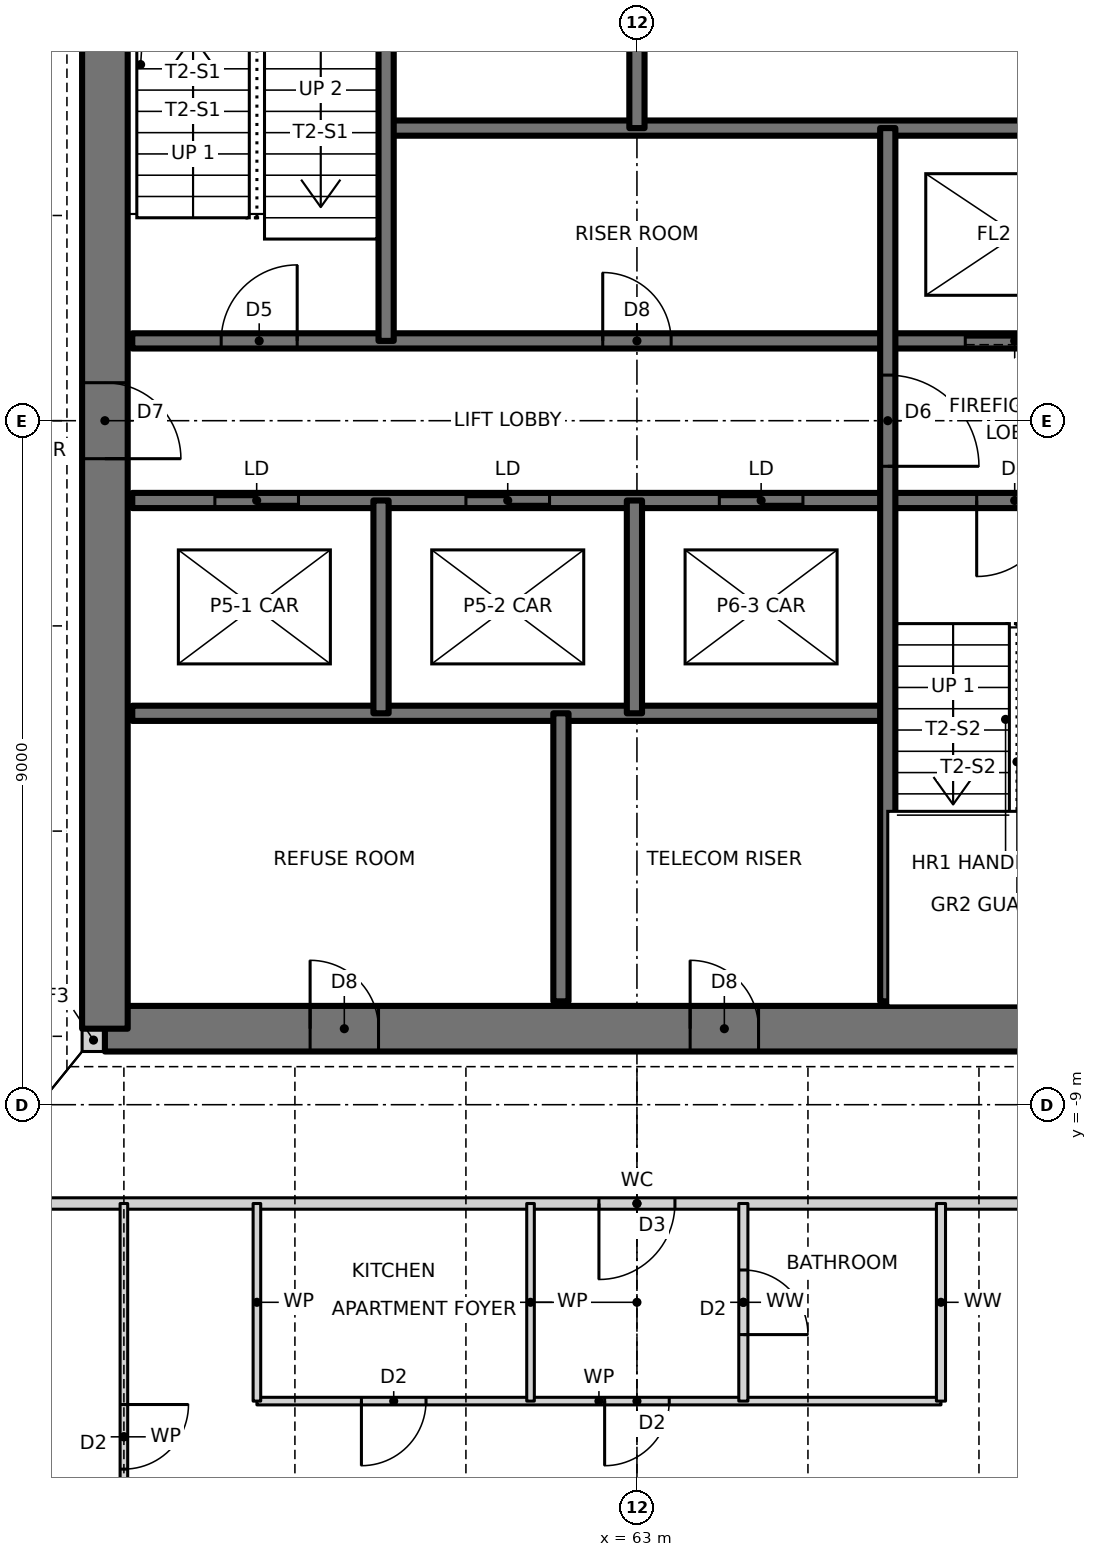
"""IFC4 building model, lengths in metres.
Left out: names, types, materials, properties, quantities, classifications, styles, units other than length and angle.
Written with IfcOpenShell. Run it as: python <this file> out.ifc"""

import sys

from ifc_helpers import new_model, si_unit, direction, frame, frame_2d, origin, place, context, subcontext, project, spatial, rectangle, extrude, element, fill, save


model = new_model("IFC4")
c1 = context("Model", 3, precision=1e-05, world=origin(), true_north=direction((0.0, 1.0)))
c2 = subcontext(c1, "Body", "Model", "MODEL_VIEW")
j1 = project(units=[si_unit("LENGTHUNIT", "METRE"), si_unit("PLANEANGLEUNIT", "RADIAN")], contexts=[c1])
p1 = place(None, origin())
s1 = spatial("IfcSite", under=j1, at=p1, CompositionType="ELEMENT")
p2 = place(p1, origin())
s2 = spatial("IfcBuilding", under=s1, at=p2, CompositionType="ELEMENT")
p3 = place(p2, frame((0.0, 0.0, 108.5)))
s3 = spatial("IfcBuildingStorey", under=s2, at=p3, CompositionType="ELEMENT", Elevation=108.5)
p4 = place(p3, frame((55.7, -8.15, 0.0), z_axis=(0.0, 0.0, 1.0), x_axis=(1.0, 0.0, 0.0)))
e1 = element("IfcWall", 1, at=p4, inside=s3, PredefinedType="SOLIDWALL", context=c2, shape_type="SweptSolid", body=[
    extrude(rectangle(XDim=0.3, YDim=0.3, at=frame_2d((0.15, 0.0))), origin(), (0.0, 0.0, 1.0), 3.5),
])
p5 = place(p3, frame((56.0, -8.0, 0.0), z_axis=(0.0, 0.0, 1.0), x_axis=(1.0, 0.0, 0.0)))
e2 = element("IfcWall", 2, at=p5, inside=s3, PredefinedType="SHEAR", context=c2, shape_type="SweptSolid", body=[
    extrude(rectangle(XDim=14.0, YDim=0.6, at=frame_2d((7.0, 0.0))), origin(), (0.0, 0.0, 1.0), 3.5),
])
p6 = place(p5, frame((2.7, 0.0, 0.0)))
e3 = element("IfcOpeningElement", 3, at=p6, cuts=e2, PredefinedType="OPENING", context=c2, shape_type="SweptSolid", body=[
    extrude(rectangle(XDim=0.9, YDim=2.1, at=frame_2d((0.45, 1.05))), frame((0.0, 0.31, 0.0), z_axis=(0.0, -1.0, 0.0), x_axis=(1.0, 0.0, 0.0)), (0.0, 0.0, 1.0), 0.62),
])
p7 = place(p5, frame((7.7, 0.0, 0.0)))
e4 = element("IfcOpeningElement", 4, at=p7, cuts=e2, PredefinedType="OPENING", context=c2, shape_type="SweptSolid", body=[
    extrude(rectangle(XDim=0.9, YDim=2.1, at=frame_2d((0.45, 1.05))), frame((0.0, 0.31, 0.0), z_axis=(0.0, -1.0, 0.0), x_axis=(1.0, 0.0, 0.0)), (0.0, 0.0, 1.0), 0.62),
])
p8 = place(p3, frame((56.0, 8.0, 0.0), z_axis=(0.0, 0.0, 1.0), x_axis=(0.0, -1.0, 0.0)))
e5 = element("IfcWall", 5, at=p8, inside=s3, PredefinedType="SHEAR", context=c2, shape_type="SweptSolid", body=[
    extrude(rectangle(XDim=16.0, YDim=0.6, at=frame_2d((8.0, 0.0))), origin(), (0.0, 0.0, 1.0), 3.5),
])
p9 = place(p8, frame((7.5, 0.0, 0.0)))
e6 = element("IfcOpeningElement", 6, at=p9, cuts=e5, PredefinedType="OPENING", context=c2, shape_type="SweptSolid", body=[
    extrude(rectangle(XDim=1.0, YDim=2.1, at=frame_2d((0.5, 1.05))), frame((0.0, 0.31, 0.0), z_axis=(0.0, -1.0, 0.0), x_axis=(1.0, 0.0, 0.0)), (0.0, 0.0, 1.0), 0.62),
])
p10 = place(p3, frame((58.0, -12.9, 0.0), z_axis=(0.0, 0.0, 1.0), x_axis=(1.0, 0.0, 0.0)))
e7 = element("IfcWall", 7, at=p10, inside=s3, PredefinedType="PARTITIONING", context=c2, shape_type="SweptSolid", body=[
    extrude(rectangle(XDim=9.0, YDim=0.1, at=frame_2d((4.5, 0.0))), origin(), (0.0, 0.0, 1.0), 3.27),
])
p11 = place(p10, frame((1.375, 0.0, 0.0)))
e8 = element("IfcOpeningElement", 8, at=p11, cuts=e7, PredefinedType="OPENING", context=c2, shape_type="SweptSolid", body=[
    extrude(rectangle(XDim=0.85, YDim=2.1, at=frame_2d((0.425, 1.05))), frame((0.0, 0.06, 0.0), z_axis=(0.0, -1.0, 0.0), x_axis=(1.0, 0.0, 0.0)), (0.0, 0.0, 1.0), 0.12),
])
p12 = place(p10, frame((4.575, 0.0, 0.0)))
e9 = element("IfcOpeningElement", 9, at=p12, cuts=e7, PredefinedType="OPENING", context=c2, shape_type="SweptSolid", body=[
    extrude(rectangle(XDim=0.85, YDim=2.1, at=frame_2d((0.425, 1.05))), frame((0.0, 0.06, 0.0), z_axis=(0.0, -1.0, 0.0), x_axis=(1.0, 0.0, 0.0)), (0.0, 0.0, 1.0), 0.12),
])
p13 = place(p3, frame((53.7, -10.3, 0.0), z_axis=(0.0, 0.0, 1.0), x_axis=(1.0, 0.0, 0.0)))
e10 = element("IfcWall", 10, at=p13, inside=s3, PredefinedType="PARTITIONING", context=c2, shape_type="SweptSolid", body=[
    extrude(rectangle(XDim=18.6, YDim=0.15, at=frame_2d((9.3, 0.0))), origin(), (0.0, 0.0, 1.0), 3.27),
])
p14 = place(p13, frame((8.8, 0.0, 0.0)))
e11 = element("IfcOpeningElement", 11, at=p14, cuts=e10, PredefinedType="OPENING", context=c2, shape_type="SweptSolid", body=[
    extrude(rectangle(XDim=1.0, YDim=2.1, at=frame_2d((0.5, 1.05))), frame((0.0, 0.085, 0.0), z_axis=(0.0, -1.0, 0.0), x_axis=(1.0, 0.0, 0.0)), (0.0, 0.0, 1.0), 0.17),
])
p15 = place(p3, frame((56.36, -3.85, 0.0), z_axis=(0.0, 0.0, 1.0), x_axis=(1.0, 0.0, 0.0)))
e12 = element("IfcWall", 12, at=p15, inside=s3, PredefinedType="SOLIDWALL", context=c2, shape_type="SweptSolid", body=[
    extrude(rectangle(XDim=9.94, YDim=0.2, at=frame_2d((4.97, 0.0))), origin(), (0.0, 0.0, 1.0), 3.5),
])
p16 = place(p3, frame((56.36, -1.05, 0.0), z_axis=(0.0, 0.0, 1.0), x_axis=(1.0, 0.0, 0.0)))
e13 = element("IfcWall", 13, at=p16, inside=s3, PredefinedType="SOLIDWALL", context=c2, shape_type="SweptSolid", body=[
    extrude(rectangle(XDim=13.28, YDim=0.2, at=frame_2d((6.64, 0.0))), origin(), (0.0, 0.0, 1.0), 3.5),
])
p17 = place(p16, frame((11.11, 0.0, 0.0)))
e14 = element("IfcOpeningElement", 14, at=p17, cuts=e13, PredefinedType="OPENING", context=c2, shape_type="SweptSolid", body=[
    extrude(rectangle(XDim=1.0, YDim=2.1, at=frame_2d((0.5, 1.05))), frame((0.0, 0.11, 0.0), z_axis=(0.0, -1.0, 0.0), x_axis=(1.0, 0.0, 0.0)), (0.0, 0.0, 1.0), 0.22),
])
p18 = place(p16, frame((1.087, 0.0, 0.0)))
e15 = element("IfcOpeningElement", 15, at=p18, cuts=e13, PredefinedType="OPENING", context=c2, shape_type="SweptSolid", body=[
    extrude(rectangle(XDim=1.1, YDim=2.1, at=frame_2d((0.55, 1.05))), frame((0.0, 0.11, 0.0), z_axis=(0.0, -1.0, 0.0), x_axis=(1.0, 0.0, 0.0)), (0.0, 0.0, 1.0), 0.22),
])
p19 = place(p16, frame((4.39, 0.0, 0.0)))
e16 = element("IfcOpeningElement", 16, at=p19, cuts=e13, PredefinedType="OPENING", context=c2, shape_type="SweptSolid", body=[
    extrude(rectangle(XDim=1.1, YDim=2.1, at=frame_2d((0.55, 1.05))), frame((0.0, 0.11, 0.0), z_axis=(0.0, -1.0, 0.0), x_axis=(1.0, 0.0, 0.0)), (0.0, 0.0, 1.0), 0.22),
])
p20 = place(p16, frame((7.724, 0.0, 0.0)))
e17 = element("IfcOpeningElement", 17, at=p20, cuts=e13, PredefinedType="OPENING", context=c2, shape_type="SweptSolid", body=[
    extrude(rectangle(XDim=1.1, YDim=2.1, at=frame_2d((0.55, 1.05))), frame((0.0, 0.11, 0.0), z_axis=(0.0, -1.0, 0.0), x_axis=(1.0, 0.0, 0.0)), (0.0, 0.0, 1.0), 0.22),
])
p21 = place(p3, frame((56.36, 1.05, 0.0), z_axis=(0.0, 0.0, 1.0), x_axis=(1.0, 0.0, 0.0)))
e18 = element("IfcWall", 18, at=p21, inside=s3, PredefinedType="SOLIDWALL", context=c2, shape_type="SweptSolid", body=[
    extrude(rectangle(XDim=13.28, YDim=0.2, at=frame_2d((6.64, 0.0))), origin(), (0.0, 0.0, 1.0), 3.5),
])
p22 = place(p21, frame((1.17, 0.0, 0.0)))
e19 = element("IfcOpeningElement", 19, at=p22, cuts=e18, PredefinedType="OPENING", context=c2, shape_type="SweptSolid", body=[
    extrude(rectangle(XDim=1.0, YDim=2.1, at=frame_2d((0.5, 1.05))), frame((0.0, 0.11, 0.0), z_axis=(0.0, -1.0, 0.0), x_axis=(1.0, 0.0, 0.0)), (0.0, 0.0, 1.0), 0.22),
])
p23 = place(p21, frame((6.19, 0.0, 0.0)))
e20 = element("IfcOpeningElement", 20, at=p23, cuts=e18, PredefinedType="OPENING", context=c2, shape_type="SweptSolid", body=[
    extrude(rectangle(XDim=0.9, YDim=2.1, at=frame_2d((0.45, 1.05))), frame((0.0, 0.11, 0.0), z_axis=(0.0, -1.0, 0.0), x_axis=(1.0, 0.0, 0.0)), (0.0, 0.0, 1.0), 0.22),
])
p24 = place(p21, frame((10.96, 0.0, 0.0)))
e21 = element("IfcOpeningElement", 21, at=p24, cuts=e18, PredefinedType="OPENING", context=c2, shape_type="SweptSolid", body=[
    extrude(rectangle(XDim=1.3, YDim=2.1, at=frame_2d((0.65, 1.05))), frame((0.0, 0.11, 0.0), z_axis=(0.0, -1.0, 0.0), x_axis=(1.0, 0.0, 0.0)), (0.0, 0.0, 1.0), 0.22),
])
p25 = place(p3, frame((59.7, 3.85, 0.0), z_axis=(0.0, 0.0, 1.0), x_axis=(1.0, 0.0, 0.0)))
e22 = element("IfcWall", 22, at=p25, inside=s3, PredefinedType="SOLIDWALL", context=c2, shape_type="SweptSolid", body=[
    extrude(rectangle(XDim=9.94, YDim=0.2, at=frame_2d((4.97, 0.0))), origin(), (0.0, 0.0, 1.0), 3.5),
])
p26 = place(p3, frame((67.0, -12.9, 0.0), z_axis=(0.0, 0.0, 1.0), x_axis=(0.0, 1.0, 0.0)))
e23 = element("IfcWall", 23, at=p26, inside=s3, PredefinedType="PARTITIONING", context=c2, shape_type="SweptSolid", body=[
    extrude(rectangle(XDim=2.6, YDim=0.12, at=frame_2d((1.3, 0.0))), origin(), (0.0, 0.0, 1.0), 3.27),
])
p27 = place(p3, frame((66.3, -7.64, 0.0), z_axis=(0.0, 0.0, 1.0), x_axis=(0.0, 1.0, 0.0)))
e24 = element("IfcWall", 24, at=p27, inside=s3, PredefinedType="SOLIDWALL", context=c2, shape_type="SweptSolid", body=[
    extrude(rectangle(XDim=11.49, YDim=0.2, at=frame_2d((5.745, 0.0))), origin(), (0.0, 0.0, 1.0), 3.5),
])
p28 = place(p27, frame((7.04, 0.0, 0.0)))
e25 = element("IfcOpeningElement", 25, at=p28, cuts=e24, PredefinedType="OPENING", context=c2, shape_type="SweptSolid", body=[
    extrude(rectangle(XDim=1.2, YDim=2.1, at=frame_2d((0.6, 1.05))), frame((0.0, 0.11, 0.0), z_axis=(0.0, -1.0, 0.0), x_axis=(1.0, 0.0, 0.0)), (0.0, 0.0, 1.0), 0.22),
])
p29 = place(p3, frame((64.4, -12.9, 0.0), z_axis=(0.0, 0.0, 1.0), x_axis=(0.0, 1.0, 0.0)))
e26 = element("IfcWall", 26, at=p29, inside=s3, PredefinedType="PARTITIONING", context=c2, shape_type="SweptSolid", body=[
    extrude(rectangle(XDim=2.6, YDim=0.12, at=frame_2d((1.3, 0.0))), origin(), (0.0, 0.0, 1.0), 3.27),
])
p30 = place(p29, frame((0.875, 0.0, 0.0)))
e27 = element("IfcOpeningElement", 27, at=p30, cuts=e26, PredefinedType="OPENING", context=c2, shape_type="SweptSolid", body=[
    extrude(rectangle(XDim=0.85, YDim=2.1, at=frame_2d((0.425, 1.05))), frame((0.0, 0.07, 0.0), z_axis=(0.0, -1.0, 0.0), x_axis=(1.0, 0.0, 0.0)), (0.0, 0.0, 1.0), 0.14),
])
p31 = place(p3, frame((63.0, 3.85, 0.0), z_axis=(0.0, 0.0, 1.0), x_axis=(0.0, 1.0, 0.0)))
e28 = element("IfcWall", 28, at=p31, inside=s3, PredefinedType="SOLIDWALL", context=c2, shape_type="SweptSolid", body=[
    extrude(rectangle(XDim=3.79, YDim=0.2, at=frame_2d((1.895, 0.0))), origin(), (0.0, 0.0, 1.0), 3.5),
])
p32 = place(p3, frame((62.967, -3.85, 0.0), z_axis=(0.0, 0.0, 1.0), x_axis=(0.0, 1.0, 0.0)))
e29 = element("IfcWall", 29, at=p32, inside=s3, PredefinedType="SOLIDWALL", context=c2, shape_type="SweptSolid", body=[
    extrude(rectangle(XDim=2.8, YDim=0.2, at=frame_2d((1.4, 0.0))), origin(), (0.0, 0.0, 1.0), 3.5),
])
p33 = place(p3, frame((62.0, -7.64, 0.0), z_axis=(0.0, 0.0, 1.0), x_axis=(0.0, 1.0, 0.0)))
e30 = element("IfcWall", 30, at=p33, inside=s3, PredefinedType="SOLIDWALL", context=c2, shape_type="SweptSolid", body=[
    extrude(rectangle(XDim=3.79, YDim=0.2, at=frame_2d((1.895, 0.0))), origin(), (0.0, 0.0, 1.0), 3.5),
])
p34 = place(p3, frame((61.6, -12.9, 0.0), z_axis=(0.0, 0.0, 1.0), x_axis=(0.0, 1.0, 0.0)))
e31 = element("IfcWall", 31, at=p34, inside=s3, PredefinedType="PARTITIONING", context=c2, shape_type="SweptSolid", body=[
    extrude(rectangle(XDim=2.6, YDim=0.1, at=frame_2d((1.3, 0.0))), origin(), (0.0, 0.0, 1.0), 3.27),
])
p35 = place(p3, frame((59.7, 1.05, 0.0), z_axis=(0.0, 0.0, 1.0), x_axis=(0.0, 1.0, 0.0)))
e32 = element("IfcWall", 32, at=p35, inside=s3, PredefinedType="SOLIDWALL", context=c2, shape_type="SweptSolid", body=[
    extrude(rectangle(XDim=6.59, YDim=0.2, at=frame_2d((3.295, 0.0))), origin(), (0.0, 0.0, 1.0), 3.5),
])
p36 = place(p3, frame((59.633, -3.85, 0.0), z_axis=(0.0, 0.0, 1.0), x_axis=(0.0, 1.0, 0.0)))
e33 = element("IfcWall", 33, at=p36, inside=s3, PredefinedType="SOLIDWALL", context=c2, shape_type="SweptSolid", body=[
    extrude(rectangle(XDim=2.8, YDim=0.2, at=frame_2d((1.4, 0.0))), origin(), (0.0, 0.0, 1.0), 3.5),
])
p37 = place(p3, frame((58.0, -12.9, 0.0), z_axis=(0.0, 0.0, 1.0), x_axis=(0.0, 1.0, 0.0)))
e34 = element("IfcWall", 34, at=p37, inside=s3, PredefinedType="PARTITIONING", context=c2, shape_type="SweptSolid", body=[
    extrude(rectangle(XDim=2.6, YDim=0.1, at=frame_2d((1.3, 0.0))), origin(), (0.0, 0.0, 1.0), 3.27),
])
p38 = place(p3, frame((56.25, -16.44, 0.0), z_axis=(0.0, 0.0, 1.0), x_axis=(0.0, 1.0, 0.0)))
e35 = element("IfcWall", 35, at=p38, inside=s3, PredefinedType="PARTITIONING", context=c2, shape_type="SweptSolid", body=[
    extrude(rectangle(XDim=6.14, YDim=0.1, at=frame_2d((3.07, 0.0))), origin(), (0.0, 0.0, 1.0), 2.587),
])
p39 = place(p38, frame((2.645, 0.0, 0.0)))
e36 = element("IfcOpeningElement", 36, at=p39, cuts=e35, PredefinedType="OPENING", context=c2, shape_type="SweptSolid", body=[
    extrude(rectangle(XDim=0.85, YDim=2.1, at=frame_2d((0.425, 1.05))), frame((0.0, 0.06, 0.0), z_axis=(0.0, -1.0, 0.0), x_axis=(1.0, 0.0, 0.0)), (0.0, 0.0, 1.0), 0.12),
])
p40 = place(p22, origin())
e37 = element("IfcDoor", 37, at=p40, inside=s3, OperationType="SINGLE_SWING_RIGHT", PredefinedType="DOOR", context=c2, shape_type="SweptSolid", body=[
    extrude(rectangle(XDim=1.0, YDim=2.1, at=frame_2d((0.5, 1.05))), frame((0.0, 0.025, 0.0), z_axis=(0.0, -1.0, 0.0), x_axis=(1.0, 0.0, 0.0)), (0.0, 0.0, 1.0), 0.05),
])
fill(e19, e37)
p41 = place(p17, frame((1.0, 0.0, 0.0), z_axis=(0.0, 0.0, 1.0), x_axis=(-1.0, 0.0, 0.0)))
e38 = element("IfcDoor", 38, at=p41, inside=s3, OperationType="SINGLE_SWING_RIGHT", PredefinedType="DOOR", context=c2, shape_type="SweptSolid", body=[
    extrude(rectangle(XDim=1.0, YDim=2.1, at=frame_2d((0.5, 1.05))), frame((0.0, 0.025, 0.0), z_axis=(0.0, -1.0, 0.0), x_axis=(1.0, 0.0, 0.0)), (0.0, 0.0, 1.0), 0.05),
])
fill(e14, e38)
p42 = place(p28, frame((1.2, 0.0, 0.0), z_axis=(0.0, 0.0, 1.0), x_axis=(-1.0, 0.0, 0.0)))
e39 = element("IfcDoor", 39, at=p42, inside=s3, OperationType="SINGLE_SWING_RIGHT", PredefinedType="DOOR", context=c2, shape_type="SweptSolid", body=[
    extrude(rectangle(XDim=1.2, YDim=2.1, at=frame_2d((0.6, 1.05))), frame((0.0, 0.025, 0.0), z_axis=(0.0, -1.0, 0.0), x_axis=(1.0, 0.0, 0.0)), (0.0, 0.0, 1.0), 0.05),
])
fill(e25, e39)
p43 = place(p23, origin())
e40 = element("IfcDoor", 40, at=p43, inside=s3, OperationType="SINGLE_SWING_LEFT", PredefinedType="DOOR", context=c2, shape_type="SweptSolid", body=[
    extrude(rectangle(XDim=0.9, YDim=2.1, at=frame_2d((0.45, 1.05))), frame((0.0, 0.025, 0.0), z_axis=(0.0, -1.0, 0.0), x_axis=(1.0, 0.0, 0.0)), (0.0, 0.0, 1.0), 0.05),
])
fill(e20, e40)
p44 = place(p11, frame((0.85, 0.0, 0.0), z_axis=(0.0, 0.0, 1.0), x_axis=(-1.0, 0.0, 0.0)))
e41 = element("IfcDoor", 41, at=p44, inside=s3, OperationType="SINGLE_SWING_RIGHT", PredefinedType="DOOR", context=c2, shape_type="SweptSolid", body=[
    extrude(rectangle(XDim=0.85, YDim=2.1, at=frame_2d((0.425, 1.05))), frame((0.0, 0.025, 0.0), z_axis=(0.0, -1.0, 0.0), x_axis=(1.0, 0.0, 0.0)), (0.0, 0.0, 1.0), 0.05),
])
fill(e8, e41)
p45 = place(p14, frame((1.0, 0.0, 0.0), z_axis=(0.0, 0.0, 1.0), x_axis=(-1.0, 0.0, 0.0)))
e42 = element("IfcDoor", 42, at=p45, inside=s3, OperationType="SINGLE_SWING_RIGHT", PredefinedType="DOOR", context=c2, shape_type="SweptSolid", body=[
    extrude(rectangle(XDim=1.0, YDim=2.1, at=frame_2d((0.5, 1.05))), frame((0.0, 0.025, 0.0), z_axis=(0.0, -1.0, 0.0), x_axis=(1.0, 0.0, 0.0)), (0.0, 0.0, 1.0), 0.05),
])
fill(e11, e42)
p46 = place(p12, frame((0.85, 0.0, 0.0), z_axis=(0.0, 0.0, 1.0), x_axis=(-1.0, 0.0, 0.0)))
e43 = element("IfcDoor", 43, at=p46, inside=s3, OperationType="SINGLE_SWING_RIGHT", PredefinedType="DOOR", context=c2, shape_type="SweptSolid", body=[
    extrude(rectangle(XDim=0.85, YDim=2.1, at=frame_2d((0.425, 1.05))), frame((0.0, 0.025, 0.0), z_axis=(0.0, -1.0, 0.0), x_axis=(1.0, 0.0, 0.0)), (0.0, 0.0, 1.0), 0.05),
])
fill(e9, e43)
p47 = place(p30, frame((0.85, 0.0, 0.0), z_axis=(0.0, 0.0, 1.0), x_axis=(-1.0, 0.0, 0.0)))
e44 = element("IfcDoor", 44, at=p47, inside=s3, OperationType="SINGLE_SWING_RIGHT", PredefinedType="DOOR", context=c2, shape_type="SweptSolid", body=[
    extrude(rectangle(XDim=0.85, YDim=2.1, at=frame_2d((0.425, 1.05))), frame((0.0, 0.025, 0.0), z_axis=(0.0, -1.0, 0.0), x_axis=(1.0, 0.0, 0.0)), (0.0, 0.0, 1.0), 0.05),
])
fill(e27, e44)
p48 = place(p39, frame((0.85, 0.0, 0.0), z_axis=(0.0, 0.0, 1.0), x_axis=(-1.0, 0.0, 0.0)))
e45 = element("IfcDoor", 45, at=p48, inside=s3, OperationType="SINGLE_SWING_LEFT", PredefinedType="DOOR", context=c2, shape_type="SweptSolid", body=[
    extrude(rectangle(XDim=0.85, YDim=2.1, at=frame_2d((0.425, 1.05))), frame((0.0, 0.025, 0.0), z_axis=(0.0, -1.0, 0.0), x_axis=(1.0, 0.0, 0.0)), (0.0, 0.0, 1.0), 0.05),
])
fill(e36, e45)
p49 = place(p9, origin())
e46 = element("IfcDoor", 46, at=p49, inside=s3, OperationType="SINGLE_SWING_RIGHT", PredefinedType="DOOR", context=c2, shape_type="SweptSolid", body=[
    extrude(rectangle(XDim=1.0, YDim=2.1, at=frame_2d((0.5, 1.05))), frame((0.0, 0.025, 0.0), z_axis=(0.0, -1.0, 0.0), x_axis=(1.0, 0.0, 0.0)), (0.0, 0.0, 1.0), 0.05),
])
fill(e6, e46)
p50 = place(p6, origin())
e47 = element("IfcDoor", 47, at=p50, inside=s3, OperationType="SINGLE_SWING_LEFT", PredefinedType="DOOR", context=c2, shape_type="SweptSolid", body=[
    extrude(rectangle(XDim=0.9, YDim=2.1, at=frame_2d((0.45, 1.05))), frame((0.0, 0.025, 0.0), z_axis=(0.0, -1.0, 0.0), x_axis=(1.0, 0.0, 0.0)), (0.0, 0.0, 1.0), 0.05),
])
fill(e3, e47)
p51 = place(p7, origin())
e48 = element("IfcDoor", 48, at=p51, inside=s3, OperationType="SINGLE_SWING_LEFT", PredefinedType="DOOR", context=c2, shape_type="SweptSolid", body=[
    extrude(rectangle(XDim=0.9, YDim=2.1, at=frame_2d((0.45, 1.05))), frame((0.0, 0.025, 0.0), z_axis=(0.0, -1.0, 0.0), x_axis=(1.0, 0.0, 0.0)), (0.0, 0.0, 1.0), 0.05),
])
fill(e4, e48)
p52 = place(p18, origin())
e49 = element("IfcDoor", 49, at=p52, inside=s3, OperationType="DOUBLE_DOOR_SLIDING", PredefinedType="DOOR", context=c2, shape_type="SweptSolid", body=[
    extrude(rectangle(XDim=1.1, YDim=2.1, at=frame_2d((0.55, 1.05))), frame((0.0, 0.025, 0.0), z_axis=(0.0, -1.0, 0.0), x_axis=(1.0, 0.0, 0.0)), (0.0, 0.0, 1.0), 0.05),
])
fill(e15, e49)
p53 = place(p19, origin())
e50 = element("IfcDoor", 50, at=p53, inside=s3, OperationType="DOUBLE_DOOR_SLIDING", PredefinedType="DOOR", context=c2, shape_type="SweptSolid", body=[
    extrude(rectangle(XDim=1.1, YDim=2.1, at=frame_2d((0.55, 1.05))), frame((0.0, 0.025, 0.0), z_axis=(0.0, -1.0, 0.0), x_axis=(1.0, 0.0, 0.0)), (0.0, 0.0, 1.0), 0.05),
])
fill(e16, e50)
p54 = place(p20, origin())
e51 = element("IfcDoor", 51, at=p54, inside=s3, OperationType="DOUBLE_DOOR_SLIDING", PredefinedType="DOOR", context=c2, shape_type="SweptSolid", body=[
    extrude(rectangle(XDim=1.1, YDim=2.1, at=frame_2d((0.55, 1.05))), frame((0.0, 0.025, 0.0), z_axis=(0.0, -1.0, 0.0), x_axis=(1.0, 0.0, 0.0)), (0.0, 0.0, 1.0), 0.05),
])
fill(e17, e51)
p55 = place(p24, origin())
e52 = element("IfcDoor", 52, at=p55, inside=s3, OperationType="SLIDING_TO_LEFT", PredefinedType="DOOR", context=c2, shape_type="SweptSolid", body=[
    extrude(rectangle(XDim=1.3, YDim=2.1, at=frame_2d((0.65, 1.05))), frame((0.0, 0.025, 0.0), z_axis=(0.0, -1.0, 0.0), x_axis=(1.0, 0.0, 0.0)), (0.0, 0.0, 1.0), 0.05),
])
fill(e21, e52)
save(model, sys.argv[1])
